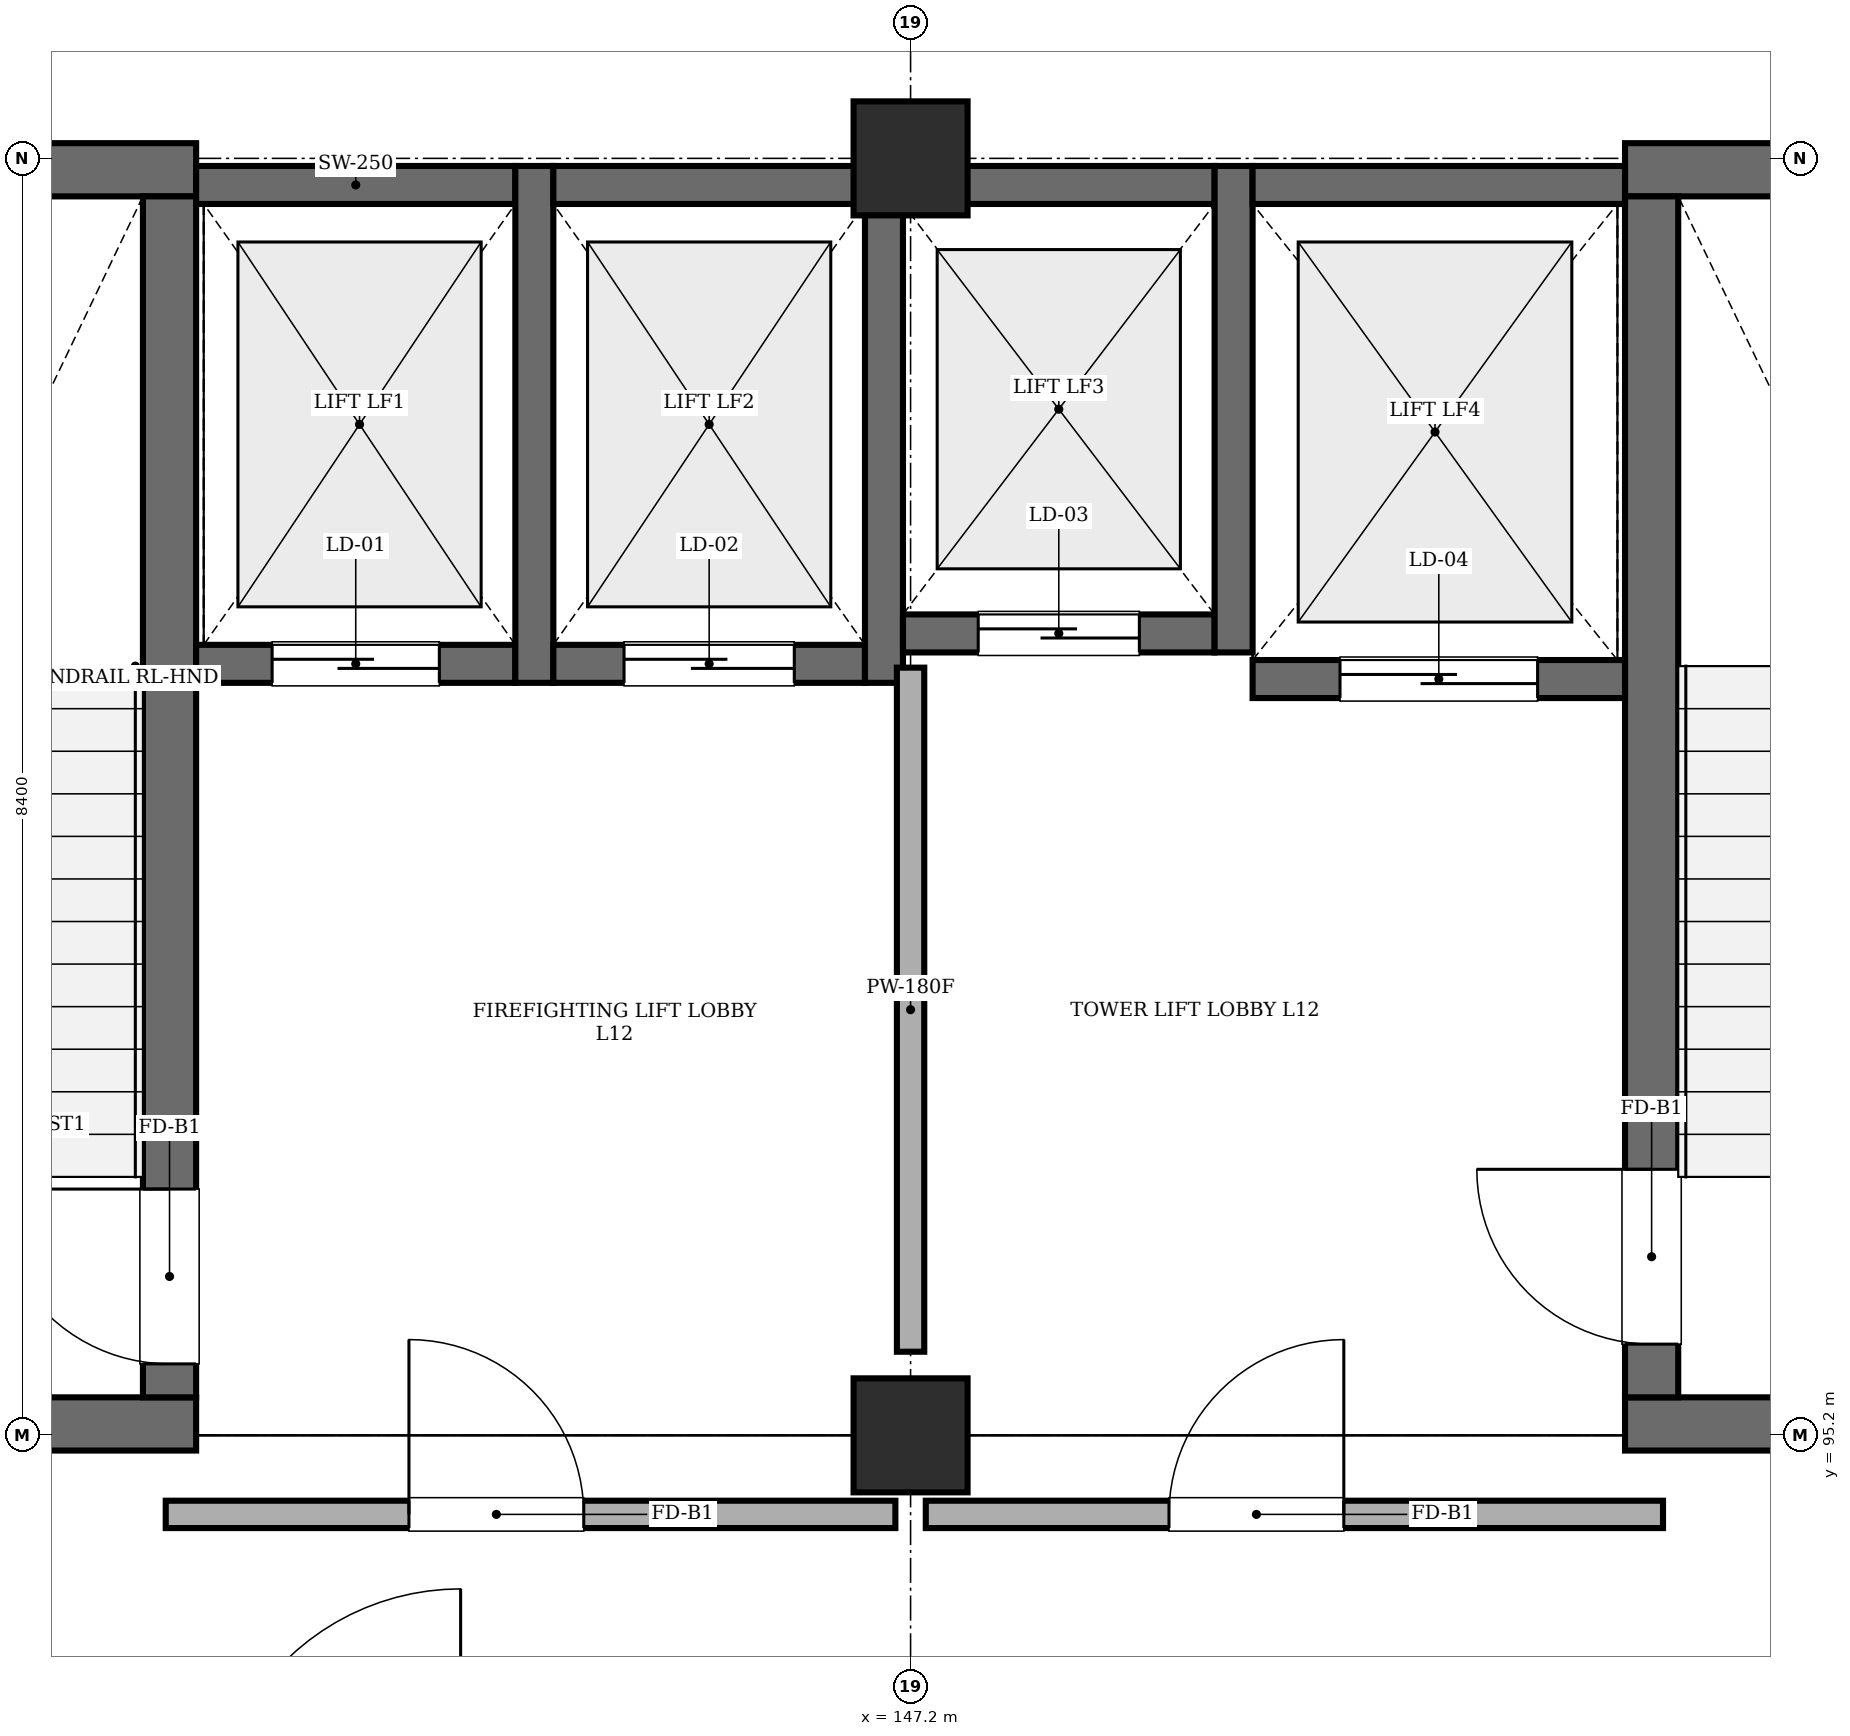
"""IFC4 building model, lengths in metres.
Left out: names, types, materials, properties, quantities, classifications, styles, units other than length and angle.
Written with IfcOpenShell. Run it as: python <this file> out.ifc"""

import sys

from ifc_helpers import new_model, si_unit, direction, frame, frame_2d, origin, origin_2d, place, context, subcontext, project, spatial, rectangle, extrude, element, fill, save


model = new_model("IFC4")
c1 = context("Model", 3, precision=1e-05, world=origin(), true_north=direction((0.0, 1.0)))
c2 = subcontext(c1, "Body", "Model", "MODEL_VIEW")
j1 = project(units=[si_unit("LENGTHUNIT", "METRE"), si_unit("PLANEANGLEUNIT", "RADIAN")], contexts=[c1])
p1 = place(None, origin())
s1 = spatial("IfcSite", under=j1, at=p1, CompositionType="ELEMENT")
p2 = place(p1, origin())
s2 = spatial("IfcBuilding", under=s1, at=p2, CompositionType="ELEMENT")
p3 = place(p2, frame((0.0, 0.0, 48.6)))
s3 = spatial("IfcBuildingStorey", under=s2, at=p3, CompositionType="ELEMENT", Elevation=48.6)
for number, where, z_axis, x_axis in (
    (1, (147.2, 95.2, 0.0), (0.0, 0.0, 1.0), (1.0, 0.0, 0.0)),
    (2, (147.2, 103.6, 0.0), (0.0, 0.0, 1.0), (1.0, 0.0, 0.0)),
):
    element("IfcColumn", number, at=place(p3, frame(where, z_axis=z_axis, x_axis=x_axis)), inside=s3, PredefinedType="COLUMN", context=c2, shape_type="SweptSolid", body=[
        extrude(rectangle(XDim=0.75, YDim=0.75, at=origin_2d()), origin(), (0.0, 0.0, 1.0), 4.03),
    ])
for number, where, z_axis, x_axis in (
    (3, (138.7, 95.275, 0.0), (0.0, 0.0, 1.0), (1.0, 0.0, 0.0)),
    (4, (138.7, 103.525, 0.0), (0.0, 0.0, 1.0), (1.0, 0.0, 0.0)),
):
    element("IfcWall", number, at=place(p3, frame(where, z_axis=z_axis, x_axis=x_axis)), inside=s3, PredefinedType="SHEAR", context=c2, shape_type="SweptSolid", body=[
        extrude(rectangle(XDim=3.8, YDim=0.35, at=frame_2d((1.9, 0.0))), origin(), (0.0, 0.0, 1.0), 4.03),
    ])
p4 = place(p3, frame((142.325, 95.45, 0.0), z_axis=(0.0, 0.0, 1.0), x_axis=(0.0, 1.0, 0.0)))
e5 = element("IfcWall", 5, at=p4, inside=s3, PredefinedType="SHEAR", context=c2, shape_type="SweptSolid", body=[
    extrude(rectangle(XDim=7.9, YDim=0.35, at=frame_2d((3.95, 0.0))), origin(), (0.0, 0.0, 1.0), 4.03),
])
p5 = place(p4, frame((0.22, 0.0, 0.0)))
e6 = element("IfcOpeningElement", 6, at=p5, cuts=e5, PredefinedType="OPENING", context=c2, shape_type="SweptSolid", body=[
    extrude(rectangle(XDim=1.15, YDim=2.15, at=frame_2d((0.575, 1.075))), frame((0.0, 0.185, 0.0), z_axis=(0.0, -1.0, 0.0), x_axis=(1.0, 0.0, 0.0)), (0.0, 0.0, 1.0), 0.37),
])
for number, where, z_axis, x_axis in (
    (7, (151.9, 95.275, 0.0), (0.0, 0.0, 1.0), (1.0, 0.0, 0.0)),
    (8, (151.9, 103.525, 0.0), (0.0, 0.0, 1.0), (1.0, 0.0, 0.0)),
):
    element("IfcWall", number, at=place(p3, frame(where, z_axis=z_axis, x_axis=x_axis)), inside=s3, PredefinedType="SHEAR", context=c2, shape_type="SweptSolid", body=[
        extrude(rectangle(XDim=3.8, YDim=0.35, at=frame_2d((1.9, 0.0))), origin(), (0.0, 0.0, 1.0), 4.03),
    ])
p6 = place(p3, frame((152.075, 95.45, 0.0), z_axis=(0.0, 0.0, 1.0), x_axis=(0.0, 1.0, 0.0)))
e9 = element("IfcWall", 9, at=p6, inside=s3, PredefinedType="SHEAR", context=c2, shape_type="SweptSolid", body=[
    extrude(rectangle(XDim=7.9, YDim=0.35, at=frame_2d((3.95, 0.0))), origin(), (0.0, 0.0, 1.0), 4.03),
])
p7 = place(p6, frame((0.35, 0.0, 0.0)))
e10 = element("IfcOpeningElement", 10, at=p7, cuts=e9, PredefinedType="OPENING", context=c2, shape_type="SweptSolid", body=[
    extrude(rectangle(XDim=1.15, YDim=2.15, at=frame_2d((0.575, 1.075))), frame((0.0, 0.185, 0.0), z_axis=(0.0, -1.0, 0.0), x_axis=(1.0, 0.0, 0.0)), (0.0, 0.0, 1.0), 0.37),
])
p8 = place(p3, frame((142.5, 100.275, 0.0), z_axis=(0.0, 0.0, 1.0), x_axis=(1.0, 0.0, 0.0)))
e11 = element("IfcWall", 11, at=p8, inside=s3, PredefinedType="SHEAR", context=c2, shape_type="SweptSolid", body=[
    extrude(rectangle(XDim=2.1, YDim=0.25, at=frame_2d((1.05, 0.0))), origin(), (0.0, 0.0, 1.0), 4.03),
])
p9 = place(p8, frame((0.5, 0.0, 0.0)))
e12 = element("IfcOpeningElement", 12, at=p9, cuts=e11, PredefinedType="OPENING", context=c2, shape_type="SweptSolid", body=[
    extrude(rectangle(XDim=1.1, YDim=2.15, at=frame_2d((0.55, 1.075))), frame((0.0, 0.135, 0.0), z_axis=(0.0, -1.0, 0.0), x_axis=(1.0, 0.0, 0.0)), (0.0, 0.0, 1.0), 0.27),
])
p10 = place(p3, frame((142.5, 103.425, 0.0), z_axis=(0.0, 0.0, 1.0), x_axis=(1.0, 0.0, 0.0)))
e13 = element("IfcWall", 13, at=p10, inside=s3, PredefinedType="SHEAR", context=c2, shape_type="SweptSolid", body=[
    extrude(rectangle(XDim=2.1, YDim=0.25, at=frame_2d((1.05, 0.0))), origin(), (0.0, 0.0, 1.0), 4.03),
])
p11 = place(p3, frame((144.725, 100.15, 0.0), z_axis=(0.0, 0.0, 1.0), x_axis=(0.0, 1.0, 0.0)))
e14 = element("IfcWall", 14, at=p11, inside=s3, PredefinedType="SHEAR", context=c2, shape_type="SweptSolid", body=[
    extrude(rectangle(XDim=3.4, YDim=0.25, at=frame_2d((1.7, 0.0))), origin(), (0.0, 0.0, 1.0), 4.03),
])
p12 = place(p3, frame((144.85, 100.275, 0.0), z_axis=(0.0, 0.0, 1.0), x_axis=(1.0, 0.0, 0.0)))
e15 = element("IfcWall", 15, at=p12, inside=s3, PredefinedType="SHEAR", context=c2, shape_type="SweptSolid", body=[
    extrude(rectangle(XDim=2.05, YDim=0.25, at=frame_2d((1.025, 0.0))), origin(), (0.0, 0.0, 1.0), 4.03),
])
p13 = place(p12, frame((0.465, 0.0, 0.0)))
e16 = element("IfcOpeningElement", 16, at=p13, cuts=e15, PredefinedType="OPENING", context=c2, shape_type="SweptSolid", body=[
    extrude(rectangle(XDim=1.12, YDim=2.15, at=frame_2d((0.56, 1.075))), frame((0.0, 0.135, 0.0), z_axis=(0.0, -1.0, 0.0), x_axis=(1.0, 0.0, 0.0)), (0.0, 0.0, 1.0), 0.27),
])
p14 = place(p3, frame((144.85, 103.425, 0.0), z_axis=(0.0, 0.0, 1.0), x_axis=(1.0, 0.0, 0.0)))
e17 = element("IfcWall", 17, at=p14, inside=s3, PredefinedType="SHEAR", context=c2, shape_type="SweptSolid", body=[
    extrude(rectangle(XDim=2.05, YDim=0.25, at=frame_2d((1.025, 0.0))), origin(), (0.0, 0.0, 1.0), 4.03),
])
p15 = place(p3, frame((147.025, 100.15, 0.0), z_axis=(0.0, 0.0, 1.0), x_axis=(0.0, 1.0, 0.0)))
e18 = element("IfcWall", 18, at=p15, inside=s3, PredefinedType="SHEAR", context=c2, shape_type="SweptSolid", body=[
    extrude(rectangle(XDim=3.4, YDim=0.25, at=frame_2d((1.7, 0.0))), origin(), (0.0, 0.0, 1.0), 4.03),
])
p16 = place(p3, frame((147.15, 100.475, 0.0), z_axis=(0.0, 0.0, 1.0), x_axis=(1.0, 0.0, 0.0)))
e19 = element("IfcWall", 19, at=p16, inside=s3, PredefinedType="SHEAR", context=c2, shape_type="SweptSolid", body=[
    extrude(rectangle(XDim=2.05, YDim=0.25, at=frame_2d((1.025, 0.0))), origin(), (0.0, 0.0, 1.0), 4.03),
])
p17 = place(p16, frame((0.495, 0.0, 0.0)))
e20 = element("IfcOpeningElement", 20, at=p17, cuts=e19, PredefinedType="OPENING", context=c2, shape_type="SweptSolid", body=[
    extrude(rectangle(XDim=1.06, YDim=2.15, at=frame_2d((0.53, 1.075))), frame((0.0, 0.135, 0.0), z_axis=(0.0, -1.0, 0.0), x_axis=(1.0, 0.0, 0.0)), (0.0, 0.0, 1.0), 0.27),
])
p18 = place(p3, frame((147.15, 103.425, 0.0), z_axis=(0.0, 0.0, 1.0), x_axis=(1.0, 0.0, 0.0)))
e21 = element("IfcWall", 21, at=p18, inside=s3, PredefinedType="SHEAR", context=c2, shape_type="SweptSolid", body=[
    extrude(rectangle(XDim=2.05, YDim=0.25, at=frame_2d((1.025, 0.0))), origin(), (0.0, 0.0, 1.0), 4.03),
])
p19 = place(p3, frame((149.325, 100.35, 0.0), z_axis=(0.0, 0.0, 1.0), x_axis=(0.0, 1.0, 0.0)))
e22 = element("IfcWall", 22, at=p19, inside=s3, PredefinedType="SHEAR", context=c2, shape_type="SweptSolid", body=[
    extrude(rectangle(XDim=3.2, YDim=0.25, at=frame_2d((1.6, 0.0))), origin(), (0.0, 0.0, 1.0), 4.03),
])
p20 = place(p3, frame((149.45, 100.175, 0.0), z_axis=(0.0, 0.0, 1.0), x_axis=(1.0, 0.0, 0.0)))
e23 = element("IfcWall", 23, at=p20, inside=s3, PredefinedType="SHEAR", context=c2, shape_type="SweptSolid", body=[
    extrude(rectangle(XDim=2.45, YDim=0.25, at=frame_2d((1.225, 0.0))), origin(), (0.0, 0.0, 1.0), 4.03),
])
p21 = place(p20, frame((0.575, 0.0, 0.0)))
e24 = element("IfcOpeningElement", 24, at=p21, cuts=e23, PredefinedType="OPENING", context=c2, shape_type="SweptSolid", body=[
    extrude(rectangle(XDim=1.3, YDim=2.25, at=frame_2d((0.65, 1.125))), frame((0.0, 0.135, 0.0), z_axis=(0.0, -1.0, 0.0), x_axis=(1.0, 0.0, 0.0)), (0.0, 0.0, 1.0), 0.27),
])
p22 = place(p3, frame((149.45, 103.425, 0.0), z_axis=(0.0, 0.0, 1.0), x_axis=(1.0, 0.0, 0.0)))
e25 = element("IfcWall", 25, at=p22, inside=s3, PredefinedType="SHEAR", context=c2, shape_type="SweptSolid", body=[
    extrude(rectangle(XDim=2.45, YDim=0.25, at=frame_2d((1.225, 0.0))), origin(), (0.0, 0.0, 1.0), 4.03),
])
p23 = place(p3, frame((142.3, 94.68, 0.0), z_axis=(0.0, 0.0, 1.0), x_axis=(1.0, 0.0, 0.0)))
e26 = element("IfcWall", 26, at=p23, inside=s3, PredefinedType="STANDARD", context=c2, shape_type="SweptSolid", body=[
    extrude(rectangle(XDim=4.8, YDim=0.18, at=frame_2d((2.4, 0.0))), origin(), (0.0, 0.0, 1.0), 4.03),
])
p24 = place(p23, frame((1.6, 0.0, 0.0)))
e27 = element("IfcOpeningElement", 27, at=p24, cuts=e26, PredefinedType="OPENING", context=c2, shape_type="SweptSolid", body=[
    extrude(rectangle(XDim=1.15, YDim=2.15, at=frame_2d((0.575, 1.075))), frame((0.0, 0.1, 0.0), z_axis=(0.0, -1.0, 0.0), x_axis=(1.0, 0.0, 0.0)), (0.0, 0.0, 1.0), 0.2),
])
p25 = place(p3, frame((147.3, 94.68, 0.0), z_axis=(0.0, 0.0, 1.0), x_axis=(1.0, 0.0, 0.0)))
e28 = element("IfcWall", 28, at=p25, inside=s3, PredefinedType="STANDARD", context=c2, shape_type="SweptSolid", body=[
    extrude(rectangle(XDim=4.85, YDim=0.18, at=frame_2d((2.425, 0.0))), origin(), (0.0, 0.0, 1.0), 4.03),
])
p26 = place(p25, frame((1.6, 0.0, 0.0)))
e29 = element("IfcOpeningElement", 29, at=p26, cuts=e28, PredefinedType="OPENING", context=c2, shape_type="SweptSolid", body=[
    extrude(rectangle(XDim=1.15, YDim=2.15, at=frame_2d((0.575, 1.075))), frame((0.0, 0.1, 0.0), z_axis=(0.0, -1.0, 0.0), x_axis=(1.0, 0.0, 0.0)), (0.0, 0.0, 1.0), 0.2),
])
p27 = place(p3, frame((147.2, 95.75, 0.0), z_axis=(0.0, 0.0, 1.0), x_axis=(0.0, 1.0, 0.0)))
e30 = element("IfcWall", 30, at=p27, inside=s3, PredefinedType="STANDARD", context=c2, shape_type="SweptSolid", body=[
    extrude(rectangle(XDim=4.5, YDim=0.18, at=frame_2d((2.25, 0.0))), origin(), (0.0, 0.0, 1.0), 3.33),
])
p28 = place(p24, origin())
e31 = element("IfcDoor", 31, at=p28, inside=s3, OperationType="SINGLE_SWING_LEFT", PredefinedType="DOOR", context=c2, shape_type="SweptSolid", body=[
    extrude(rectangle(XDim=1.15, YDim=2.15, at=frame_2d((0.575, 1.075))), frame((0.0, 0.025, 0.0), z_axis=(0.0, -1.0, 0.0), x_axis=(1.0, 0.0, 0.0)), (0.0, 0.0, 1.0), 0.05),
])
fill(e27, e31)
p29 = place(p26, origin())
e32 = element("IfcDoor", 32, at=p29, inside=s3, OperationType="SINGLE_SWING_RIGHT", PredefinedType="DOOR", context=c2, shape_type="SweptSolid", body=[
    extrude(rectangle(XDim=1.15, YDim=2.15, at=frame_2d((0.575, 1.075))), frame((0.0, 0.025, 0.0), z_axis=(0.0, -1.0, 0.0), x_axis=(1.0, 0.0, 0.0)), (0.0, 0.0, 1.0), 0.05),
])
fill(e29, e32)
p30 = place(p5, origin())
e33 = element("IfcDoor", 33, at=p30, inside=s3, OperationType="SINGLE_SWING_RIGHT", PredefinedType="DOOR", context=c2, shape_type="SweptSolid", body=[
    extrude(rectangle(XDim=1.15, YDim=2.15, at=frame_2d((0.575, 1.075))), frame((0.0, 0.025, 0.0), z_axis=(0.0, -1.0, 0.0), x_axis=(1.0, 0.0, 0.0)), (0.0, 0.0, 1.0), 0.05),
])
fill(e6, e33)
p31 = place(p7, origin())
e34 = element("IfcDoor", 34, at=p31, inside=s3, OperationType="SINGLE_SWING_RIGHT", PredefinedType="DOOR", context=c2, shape_type="SweptSolid", body=[
    extrude(rectangle(XDim=1.15, YDim=2.15, at=frame_2d((0.575, 1.075))), frame((0.0, 0.025, 0.0), z_axis=(0.0, -1.0, 0.0), x_axis=(1.0, 0.0, 0.0)), (0.0, 0.0, 1.0), 0.05),
])
fill(e10, e34)
p32 = place(p9, origin())
e35 = element("IfcDoor", 35, at=p32, inside=s3, OperationType="SLIDING_TO_LEFT", PredefinedType="DOOR", context=c2, shape_type="SweptSolid", body=[
    extrude(rectangle(XDim=1.1, YDim=2.15, at=frame_2d((0.55, 1.075))), frame((0.0, 0.025, 0.0), z_axis=(0.0, -1.0, 0.0), x_axis=(1.0, 0.0, 0.0)), (0.0, 0.0, 1.0), 0.05),
])
fill(e12, e35)
p33 = place(p13, origin())
e36 = element("IfcDoor", 36, at=p33, inside=s3, OperationType="SLIDING_TO_LEFT", PredefinedType="DOOR", context=c2, shape_type="SweptSolid", body=[
    extrude(rectangle(XDim=1.12, YDim=2.15, at=frame_2d((0.56, 1.075))), frame((0.0, 0.025, 0.0), z_axis=(0.0, -1.0, 0.0), x_axis=(1.0, 0.0, 0.0)), (0.0, 0.0, 1.0), 0.05),
])
fill(e16, e36)
p34 = place(p17, origin())
e37 = element("IfcDoor", 37, at=p34, inside=s3, OperationType="SLIDING_TO_LEFT", PredefinedType="DOOR", context=c2, shape_type="SweptSolid", body=[
    extrude(rectangle(XDim=1.06, YDim=2.15, at=frame_2d((0.53, 1.075))), frame((0.0, 0.025, 0.0), z_axis=(0.0, -1.0, 0.0), x_axis=(1.0, 0.0, 0.0)), (0.0, 0.0, 1.0), 0.05),
])
fill(e20, e37)
p35 = place(p21, origin())
e38 = element("IfcDoor", 38, at=p35, inside=s3, OperationType="SLIDING_TO_LEFT", PredefinedType="DOOR", context=c2, shape_type="SweptSolid", body=[
    extrude(rectangle(XDim=1.3, YDim=2.25, at=frame_2d((0.65, 1.125))), frame((0.0, 0.025, 0.0), z_axis=(0.0, -1.0, 0.0), x_axis=(1.0, 0.0, 0.0)), (0.0, 0.0, 1.0), 0.05),
])
fill(e24, e38)
save(model, sys.argv[1])
